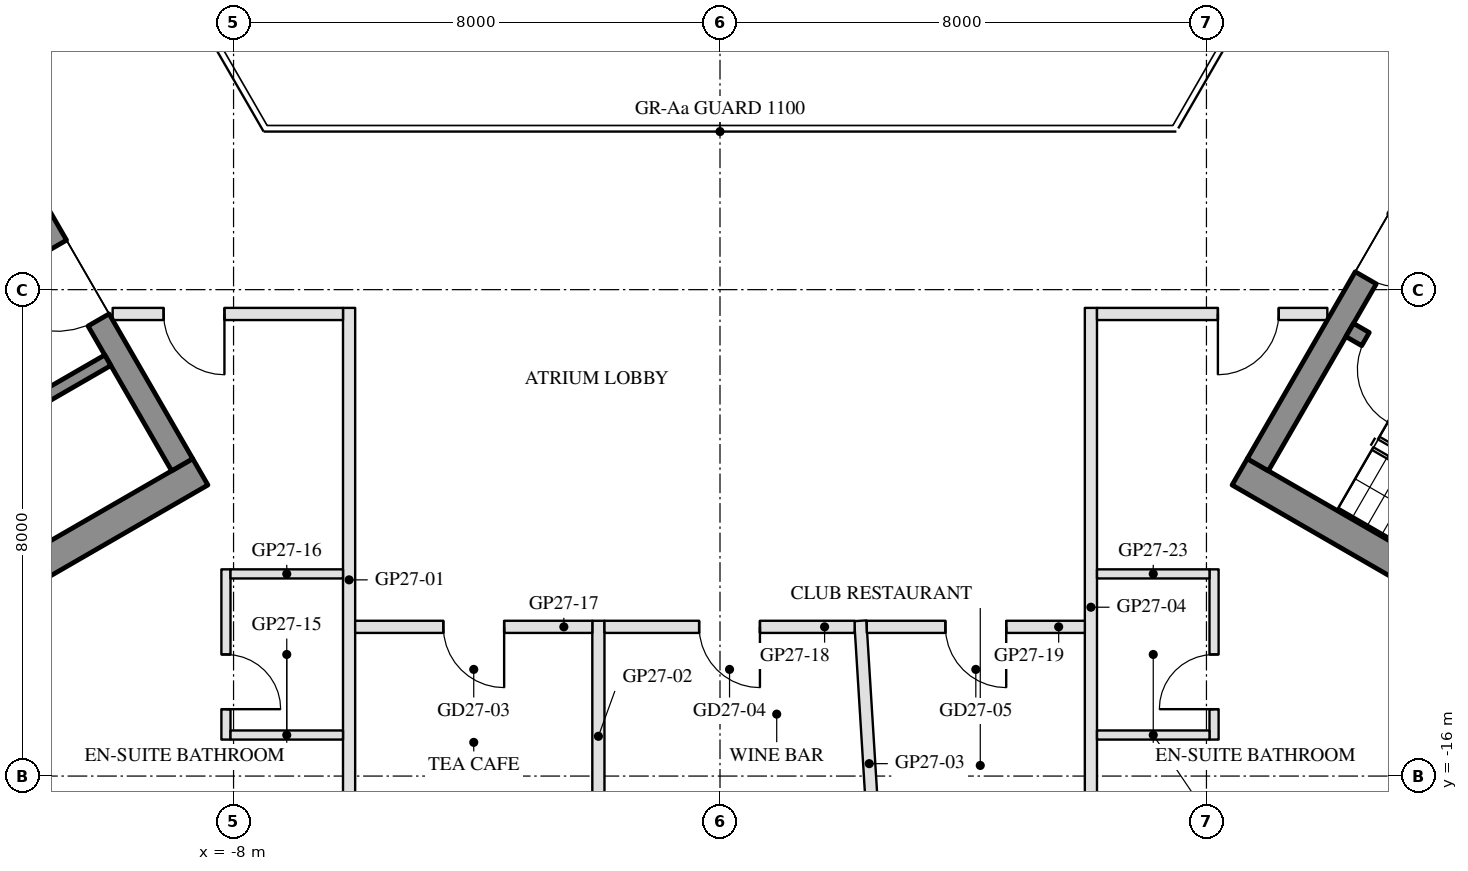
"""IFC4 building model, lengths in metres.
Left out: names, types, materials, properties, quantities, classifications, styles, units other than length and angle.
Written with IfcOpenShell. Run it as: python <this file> out.ifc"""

import sys

from ifc_helpers import new_model, si_unit, direction, frame, frame_2d, origin, origin_2d, place, context, subcontext, project, spatial, rectangle, hollow_rectangle, extrude, boolean, halfspace, element, fill, save


model = new_model("IFC4")
c1 = context("Model", 3, precision=1e-05, world=origin(), true_north=direction((0.0, 1.0)))
c2 = subcontext(c1, "Body", "Model", "MODEL_VIEW")
j1 = project(units=[si_unit("LENGTHUNIT", "METRE"), si_unit("PLANEANGLEUNIT", "RADIAN")], contexts=[c1])
p1 = place(None, origin())
s1 = spatial("IfcSite", under=j1, at=p1, CompositionType="ELEMENT")
p2 = place(p1, origin())
s2 = spatial("IfcBuilding", under=s1, at=p2, CompositionType="ELEMENT")
p3 = place(p2, frame((0.0, 0.0, 276.3)))
s3 = spatial("IfcBuildingStorey", under=s2, at=p3, CompositionType="ELEMENT", Elevation=276.3)
p4 = place(p3, frame((-7.444, -17.096, 0.0), z_axis=(0.060871062735, 0.151168564354, 0.986632038235), x_axis=(-0.998135304591, 0.004721094283, 0.0608574153)))
e1 = element("IfcColumn", 1, at=p4, inside=s3, PredefinedType="COLUMN", context=c2, shape_type="SweptSolid", body=[
    boolean("DIFFERENCE", boolean("DIFFERENCE", extrude(hollow_rectangle(XDim=0.65, YDim=0.65, WallThickness=0.03, at=origin_2d()), origin(), (0.0, 0.0, 1.0), 3.75), halfspace(frame((0.0, 0.0, 0.04), z_axis=(0.0, 0.0, 1.0), x_axis=(1.0, 0.0, 0.0)), True)), halfspace(frame((0.0, 0.0, 3.71), z_axis=(0.0, 0.0, 1.0), x_axis=(1.0, 0.0, 0.0)), False)),
])
p5 = place(p3, frame((0.0, -17.096, 0.0), z_axis=(0.0, 0.151449406449, 0.988465010653), x_axis=(-1.0, 0.0, 0.0)))
e2 = element("IfcColumn", 2, at=p5, inside=s3, PredefinedType="COLUMN", context=c2, shape_type="SweptSolid", body=[
    boolean("DIFFERENCE", boolean("DIFFERENCE", extrude(hollow_rectangle(XDim=0.65, YDim=0.65, WallThickness=0.03, at=origin_2d()), origin(), (0.0, 0.0, 1.0), 3.743), halfspace(frame((0.0, 0.0, 0.037), z_axis=(0.0, 0.0, 1.0), x_axis=(1.0, 0.0, 0.0)), True)), halfspace(frame((0.0, 0.0, 3.706), z_axis=(0.0, 0.0, 1.0), x_axis=(1.0, 0.0, 0.0)), False)),
])
p6 = place(p3, frame((7.444, -17.096, 0.0), z_axis=(-0.060871062735, 0.151168564354, 0.986632038235), x_axis=(0.998135304591, 0.004721094283, 0.0608574153)))
e3 = element("IfcColumn", 3, at=p6, inside=s3, PredefinedType="COLUMN", context=c2, shape_type="SweptSolid", body=[
    boolean("DIFFERENCE", boolean("DIFFERENCE", extrude(hollow_rectangle(XDim=0.65, YDim=0.65, WallThickness=0.03, at=origin_2d()), origin(), (0.0, 0.0, 1.0), 3.75), halfspace(frame((0.0, 0.0, 0.04), z_axis=(0.0, 0.0, 1.0), x_axis=(1.0, 0.0, 0.0)), True)), halfspace(frame((0.0, 0.0, 3.71), z_axis=(0.0, 0.0, 1.0), x_axis=(1.0, 0.0, 0.0)), False)),
])
p7 = place(p3, frame((-8.547, -10.997, 0.0), z_axis=(0.0, 0.0, 1.0), x_axis=(-0.866030218785, -0.499991660082, 0.0)))
e4 = element("IfcWall", 4, at=p7, inside=s3, PredefinedType="SHEAR", context=c2, shape_type="SweptSolid", body=[
    extrude(rectangle(XDim=13.031, YDim=0.5, at=frame_2d((6.516, 0.0))), origin(), (0.0, 0.0, 1.0), 3.5),
])
p8 = place(p3, frame((-13.845, -2.22, 0.0), z_axis=(0.0, 0.0, 1.0), x_axis=(0.500004234368, -0.866022959057, 0.0)))
e5 = element("IfcWall", 5, at=p8, inside=s3, PredefinedType="SHEAR", context=c2, shape_type="SweptSolid", body=[
    extrude(rectangle(XDim=10.0, YDim=0.4, at=frame_2d((5.0, 0.0))), origin(), (0.0, 0.0, 1.0), 3.5),
])
p9 = place(p8, frame((3.55, 0.0, 0.0)))
e6 = element("IfcOpeningElement", 6, at=p9, cuts=e5, PredefinedType="OPENING", context=c2, shape_type="SweptSolid", body=[
    extrude(rectangle(XDim=1.1, YDim=2.1, at=frame_2d((0.55, 1.05))), frame((0.0, 0.21, 0.0), z_axis=(0.0, -1.0, 0.0), x_axis=(1.0, 0.0, 0.0)), (0.0, 0.0, 1.0), 0.42),
])
p10 = place(p8, frame((5.85, 0.0, 0.0)))
e7 = element("IfcOpeningElement", 7, at=p10, cuts=e5, PredefinedType="OPENING", context=c2, shape_type="SweptSolid", body=[
    extrude(rectangle(XDim=1.4, YDim=2.1, at=frame_2d((0.7, 1.05))), frame((0.0, 0.21, 0.0), z_axis=(0.0, -1.0, 0.0), x_axis=(1.0, 0.0, 0.0)), (0.0, 0.0, 1.0), 0.42),
])
p11 = place(p3, frame((-10.068, -9.162, 0.0), z_axis=(0.0, 0.0, 1.0), x_axis=(-0.866032725843, -0.499987317609, 0.0)))
e8 = element("IfcWall", 8, at=p11, inside=s3, PredefinedType="SHEAR", context=c2, shape_type="SweptSolid", body=[
    extrude(rectangle(XDim=10.16, YDim=0.2, at=frame_2d((5.08, 0.0))), origin(), (0.0, 0.0, 1.0), 3.5),
])
p12 = place(p11, frame((1.99, 0.0, 0.0)))
e9 = element("IfcOpeningElement", 9, at=p12, cuts=e8, PredefinedType="OPENING", context=c2, shape_type="SweptSolid", body=[
    extrude(rectangle(XDim=0.9, YDim=2.1, at=frame_2d((0.45, 1.05))), frame((0.0, 0.11, 0.0), z_axis=(0.0, -1.0, 0.0), x_axis=(1.0, 0.0, 0.0)), (0.0, 0.0, 1.0), 0.22),
])
p13 = place(p11, frame((7.07, 0.0, 0.0)))
e10 = element("IfcOpeningElement", 10, at=p13, cuts=e8, PredefinedType="OPENING", context=c2, shape_type="SweptSolid", body=[
    extrude(rectangle(XDim=0.9, YDim=2.1, at=frame_2d((0.45, 1.05))), frame((0.0, 0.11, 0.0), z_axis=(0.0, -1.0, 0.0), x_axis=(1.0, 0.0, 0.0)), (0.0, 0.0, 1.0), 0.22),
])
p14 = place(p3, frame((8.547, -10.997, 0.0), z_axis=(0.0, 0.0, 1.0), x_axis=(0.866030218785, -0.499991660082, 0.0)))
e11 = element("IfcWall", 11, at=p14, inside=s3, PredefinedType="SHEAR", context=c2, shape_type="SweptSolid", body=[
    extrude(rectangle(XDim=13.031, YDim=0.5, at=frame_2d((6.516, 0.0))), origin(), (0.0, 0.0, 1.0), 3.5),
])
p15 = place(p3, frame((8.845, -10.88, 0.0), z_axis=(0.0, 0.0, 1.0), x_axis=(0.500004234368, 0.866022959057, 0.0)))
e12 = element("IfcWall", 12, at=p15, inside=s3, PredefinedType="SHEAR", context=c2, shape_type="SweptSolid", body=[
    extrude(rectangle(XDim=10.0, YDim=0.4, at=frame_2d((5.0, 0.0))), origin(), (0.0, 0.0, 1.0), 3.5),
])
p16 = place(p15, frame((3.55, 0.0, 0.0)))
e13 = element("IfcOpeningElement", 13, at=p16, cuts=e12, PredefinedType="OPENING", context=c2, shape_type="SweptSolid", body=[
    extrude(rectangle(XDim=1.1, YDim=2.1, at=frame_2d((0.55, 1.05))), frame((0.0, 0.21, 0.0), z_axis=(0.0, -1.0, 0.0), x_axis=(1.0, 0.0, 0.0)), (0.0, 0.0, 1.0), 0.42),
])
p17 = place(p15, frame((5.85, 0.0, 0.0)))
e14 = element("IfcOpeningElement", 14, at=p17, cuts=e12, PredefinedType="OPENING", context=c2, shape_type="SweptSolid", body=[
    extrude(rectangle(XDim=1.4, YDim=2.1, at=frame_2d((0.7, 1.05))), frame((0.0, 0.21, 0.0), z_axis=(0.0, -1.0, 0.0), x_axis=(1.0, 0.0, 0.0)), (0.0, 0.0, 1.0), 0.42),
])
p18 = place(p3, frame((10.356, -8.664, 0.0), z_axis=(0.0, 0.0, 1.0), x_axis=(0.866028629588, -0.499994412703, 0.0)))
e15 = element("IfcWall", 15, at=p18, inside=s3, PredefinedType="SHEAR", context=c2, shape_type="SweptSolid", body=[
    extrude(rectangle(XDim=6.45, YDim=0.25, at=frame_2d((3.225, 0.0))), origin(), (0.0, 0.0, 1.0), 3.5),
])
p19 = place(p18, frame((0.3, 0.0, 0.0)))
e16 = element("IfcOpeningElement", 16, at=p19, cuts=e15, PredefinedType="OPENING", context=c2, shape_type="SweptSolid", body=[
    extrude(rectangle(XDim=1.0, YDim=2.1, at=frame_2d((0.5, 1.05))), frame((0.0, 0.135, 0.0), z_axis=(0.0, -1.0, 0.0), x_axis=(1.0, 0.0, 0.0)), (0.0, 0.0, 1.0), 0.27),
])
p20 = place(p3, frame((-6.1, -17.246, 0.0), z_axis=(0.0, 0.0, 1.0), x_axis=(0.0, 1.0, 0.0)))
e17 = element("IfcWall", 17, at=p20, inside=s3, PredefinedType="PARTITIONING", context=c2, shape_type="SweptSolid", body=[
    extrude(rectangle(XDim=8.946, YDim=0.2, at=frame_2d((4.473, 0.0))), origin(), (0.0, 0.0, 1.0), 3.1),
])
p21 = place(p3, frame((-2.0, -17.246, 0.0), z_axis=(0.0, 0.0, 1.0), x_axis=(0.0, 1.0, 0.0)))
e18 = element("IfcWall", 18, at=p21, inside=s3, PredefinedType="PARTITIONING", context=c2, shape_type="SweptSolid", body=[
    extrude(rectangle(XDim=3.8, YDim=0.2, at=frame_2d((1.9, 0.0))), origin(), (0.0, 0.0, 1.0), 3.1),
])
p22 = place(p3, frame((2.6, -18.146, 0.0), z_axis=(0.0, 0.0, 1.0), x_axis=(-0.062110384133, 0.998069286264, 0.0)))
e19 = element("IfcWall", 19, at=p22, inside=s3, PredefinedType="PARTITIONING", context=c2, shape_type="SweptSolid", body=[
    extrude(rectangle(XDim=4.709, YDim=0.2, at=frame_2d((2.354, 0.0))), origin(), (0.0, 0.0, 1.0), 3.1),
])
p23 = place(p3, frame((6.1, -18.146, 0.0), z_axis=(0.0, 0.0, 1.0), x_axis=(0.0, 1.0, 0.0)))
e20 = element("IfcWall", 20, at=p23, inside=s3, PredefinedType="PARTITIONING", context=c2, shape_type="SweptSolid", body=[
    extrude(rectangle(XDim=9.846, YDim=0.2, at=frame_2d((4.923, 0.0))), origin(), (0.0, 0.0, 1.0), 3.1),
])
p24 = place(p3, frame((-6.2, -8.4, 0.0), z_axis=(0.0, 0.0, 1.0), x_axis=(-1.0, 0.0, 0.0)))
e21 = element("IfcWall", 21, at=p24, inside=s3, PredefinedType="PARTITIONING", context=c2, shape_type="SweptSolid", body=[
    extrude(rectangle(XDim=3.788, YDim=0.2, at=frame_2d((1.894, 0.0))), origin(), (0.0, 0.0, 1.0), 3.05),
])
p25 = place(p24, frame((1.95, 0.0, 0.0)))
e22 = element("IfcOpeningElement", 22, at=p25, cuts=e21, PredefinedType="OPENING", context=c2, shape_type="SweptSolid", body=[
    extrude(rectangle(XDim=1.0, YDim=2.1, at=frame_2d((0.5, 1.05))), frame((0.0, 0.11, 0.0), z_axis=(0.0, -1.0, 0.0), x_axis=(1.0, 0.0, 0.0)), (0.0, 0.0, 1.0), 0.22),
])
p26 = place(p3, frame((-8.125, -12.6, 0.0), z_axis=(0.0, 0.0, 1.0), x_axis=(0.0, -1.0, 0.0)))
e23 = element("IfcWall", 23, at=p26, inside=s3, PredefinedType="PARTITIONING", context=c2, shape_type="SweptSolid", body=[
    extrude(rectangle(XDim=2.8, YDim=0.15, at=frame_2d((1.4, 0.0))), origin(), (0.0, 0.0, 1.0), 3.55),
])
p27 = place(p26, frame((1.4, 0.0, 0.0)))
e24 = element("IfcOpeningElement", 24, at=p27, cuts=e23, PredefinedType="OPENING", context=c2, shape_type="SweptSolid", body=[
    extrude(rectangle(XDim=0.9, YDim=2.1, at=frame_2d((0.45, 1.05))), frame((0.0, 0.085, 0.0), z_axis=(0.0, -1.0, 0.0), x_axis=(1.0, 0.0, 0.0)), (0.0, 0.0, 1.0), 0.17),
])
for number, where, z_axis, x_axis in (
    (25, (-8.05, -15.325, 0.0), (0.0, 0.0, 1.0), (1.0, 0.0, 0.0)),
    (26, (-8.05, -12.675, 0.0), (0.0, 0.0, 1.0), (1.0, 0.0, 0.0)),
):
    element("IfcWall", number, at=place(p3, frame(where, z_axis=z_axis, x_axis=x_axis)), inside=s3, PredefinedType="PARTITIONING", context=c2, shape_type="SweptSolid", body=[
        extrude(rectangle(XDim=1.85, YDim=0.15, at=frame_2d((0.925, 0.0))), origin(), (0.0, 0.0, 1.0), 3.05),
    ])
p28 = place(p3, frame((-2.1, -13.546, 0.0), z_axis=(0.0, 0.0, 1.0), x_axis=(-1.0, 0.0, 0.0)))
e27 = element("IfcWall", 27, at=p28, inside=s3, PredefinedType="PARTITIONING", context=c2, shape_type="SweptSolid", body=[
    extrude(rectangle(XDim=3.9, YDim=0.2, at=frame_2d((1.95, 0.0))), origin(), (0.0, 0.0, 1.0), 3.05),
])
p29 = place(p28, frame((1.45, 0.0, 0.0)))
e28 = element("IfcOpeningElement", 28, at=p29, cuts=e27, PredefinedType="OPENING", context=c2, shape_type="SweptSolid", body=[
    extrude(rectangle(XDim=1.0, YDim=2.1, at=frame_2d((0.5, 1.05))), frame((0.0, 0.11, 0.0), z_axis=(0.0, -1.0, 0.0), x_axis=(1.0, 0.0, 0.0)), (0.0, 0.0, 1.0), 0.22),
])
p30 = place(p3, frame((2.214, -13.546, 0.0), z_axis=(0.0, 0.0, 1.0), x_axis=(-1.0, 0.0, 0.0)))
e29 = element("IfcWall", 29, at=p30, inside=s3, PredefinedType="PARTITIONING", context=c2, shape_type="SweptSolid", body=[
    extrude(rectangle(XDim=4.114, YDim=0.2, at=frame_2d((2.057, 0.0))), origin(), (0.0, 0.0, 1.0), 3.05),
])
p31 = place(p30, frame((1.557, 0.0, 0.0)))
e30 = element("IfcOpeningElement", 30, at=p31, cuts=e29, PredefinedType="OPENING", context=c2, shape_type="SweptSolid", body=[
    extrude(rectangle(XDim=1.0, YDim=2.1, at=frame_2d((0.5, 1.05))), frame((0.0, 0.11, 0.0), z_axis=(0.0, -1.0, 0.0), x_axis=(1.0, 0.0, 0.0)), (0.0, 0.0, 1.0), 0.22),
])
p32 = place(p3, frame((6.0, -13.546, 0.0), z_axis=(0.0, 0.0, 1.0), x_axis=(-1.0, 0.0, 0.0)))
e31 = element("IfcWall", 31, at=p32, inside=s3, PredefinedType="PARTITIONING", context=c2, shape_type="SweptSolid", body=[
    extrude(rectangle(XDim=3.586, YDim=0.2, at=frame_2d((1.793, 0.0))), origin(), (0.0, 0.0, 1.0), 3.05),
])
p33 = place(p32, frame((1.293, 0.0, 0.0)))
e32 = element("IfcOpeningElement", 32, at=p33, cuts=e31, PredefinedType="OPENING", context=c2, shape_type="SweptSolid", body=[
    extrude(rectangle(XDim=1.0, YDim=2.1, at=frame_2d((0.5, 1.05))), frame((0.0, 0.11, 0.0), z_axis=(0.0, -1.0, 0.0), x_axis=(1.0, 0.0, 0.0)), (0.0, 0.0, 1.0), 0.22),
])
p34 = place(p3, frame((9.988, -8.4, 0.0), z_axis=(0.0, 0.0, 1.0), x_axis=(-1.0, 0.0, 0.0)))
e33 = element("IfcWall", 33, at=p34, inside=s3, PredefinedType="PARTITIONING", context=c2, shape_type="SweptSolid", body=[
    extrude(rectangle(XDim=3.788, YDim=0.2, at=frame_2d((1.894, 0.0))), origin(), (0.0, 0.0, 1.0), 3.05),
])
p35 = place(p34, frame((0.8, 0.0, 0.0)))
e34 = element("IfcOpeningElement", 34, at=p35, cuts=e33, PredefinedType="OPENING", context=c2, shape_type="SweptSolid", body=[
    extrude(rectangle(XDim=1.0, YDim=2.1, at=frame_2d((0.5, 1.05))), frame((0.0, 0.11, 0.0), z_axis=(0.0, -1.0, 0.0), x_axis=(1.0, 0.0, 0.0)), (0.0, 0.0, 1.0), 0.22),
])
p36 = place(p3, frame((8.125, -15.4, 0.0), z_axis=(0.0, 0.0, 1.0), x_axis=(0.0, 1.0, 0.0)))
e35 = element("IfcWall", 35, at=p36, inside=s3, PredefinedType="PARTITIONING", context=c2, shape_type="SweptSolid", body=[
    extrude(rectangle(XDim=2.8, YDim=0.15, at=frame_2d((1.4, 0.0))), origin(), (0.0, 0.0, 1.0), 3.55),
])
p37 = place(p36, frame((0.5, 0.0, 0.0)))
e36 = element("IfcOpeningElement", 36, at=p37, cuts=e35, PredefinedType="OPENING", context=c2, shape_type="SweptSolid", body=[
    extrude(rectangle(XDim=0.9, YDim=2.1, at=frame_2d((0.45, 1.05))), frame((0.0, 0.085, 0.0), z_axis=(0.0, -1.0, 0.0), x_axis=(1.0, 0.0, 0.0)), (0.0, 0.0, 1.0), 0.17),
])
for number, where, z_axis, x_axis in (
    (37, (6.2, -15.325, 0.0), (0.0, 0.0, 1.0), (1.0, 0.0, 0.0)),
    (38, (6.2, -12.675, 0.0), (0.0, 0.0, 1.0), (1.0, 0.0, 0.0)),
):
    element("IfcWall", number, at=place(p3, frame(where, z_axis=z_axis, x_axis=x_axis)), inside=s3, PredefinedType="PARTITIONING", context=c2, shape_type="SweptSolid", body=[
        extrude(rectangle(XDim=1.85, YDim=0.15, at=frame_2d((0.925, 0.0))), origin(), (0.0, 0.0, 1.0), 3.05),
    ])
p38 = place(p3, frame((10.375, -1.169, 0.0), z_axis=(0.0, 0.0, 1.0), x_axis=(0.500055316652, -0.865993464345, 0.0)))
e39 = element("IfcWall", 39, at=p38, inside=s3, PredefinedType="PARTITIONING", context=c2, shape_type="SweptSolid", body=[
    extrude(rectangle(XDim=3.788, YDim=0.2, at=frame_2d((1.894, 0.0))), origin(), (0.0, 0.0, 1.0), 3.05),
])
p39 = place(p38, frame((1.95, 0.0, 0.0)))
e40 = element("IfcOpeningElement", 40, at=p39, cuts=e39, PredefinedType="OPENING", context=c2, shape_type="SweptSolid", body=[
    extrude(rectangle(XDim=1.0, YDim=2.1, at=frame_2d((0.5, 1.05))), frame((0.0, 0.11, 0.0), z_axis=(0.0, -1.0, 0.0), x_axis=(1.0, 0.0, 0.0)), (0.0, 0.0, 1.0), 0.22),
])
p40 = place(p3, frame((-12.269, -4.45, 0.0), z_axis=(0.0, 0.0, 1.0), x_axis=(0.500013576925, 0.866017565001, 0.0)))
e41 = element("IfcWall", 41, at=p40, inside=s3, PredefinedType="PARTITIONING", context=c2, shape_type="SweptSolid", body=[
    extrude(rectangle(XDim=3.775, YDim=0.2, at=frame_2d((1.887, 0.0))), origin(), (0.0, 0.0, 1.0), 3.05),
])
p41 = place(p40, frame((0.8, 0.0, 0.0)))
e42 = element("IfcOpeningElement", 42, at=p41, cuts=e41, PredefinedType="OPENING", context=c2, shape_type="SweptSolid", body=[
    extrude(rectangle(XDim=1.0, YDim=2.1, at=frame_2d((0.5, 1.05))), frame((0.0, 0.11, 0.0), z_axis=(0.0, -1.0, 0.0), x_axis=(1.0, 0.0, 0.0)), (0.0, 0.0, 1.0), 0.22),
])
p42 = place(p10, frame((1.4, 0.0, 0.0), z_axis=(0.0, 0.0, 1.0), x_axis=(-1.0, 0.0, 0.0)))
e43 = element("IfcDoor", 43, at=p42, inside=s3, OperationType="DOUBLE_DOOR_SINGLE_SWING", PredefinedType="DOOR", context=c2, shape_type="SweptSolid", body=[
    extrude(rectangle(XDim=1.4, YDim=2.1, at=frame_2d((0.7, 1.05))), frame((0.0, 0.025, 0.0), z_axis=(0.0, -1.0, 0.0), x_axis=(1.0, 0.0, 0.0)), (0.0, 0.0, 1.0), 0.05),
])
fill(e7, e43)
p43 = place(p16, frame((1.1, 0.0, 0.0), z_axis=(0.0, 0.0, 1.0), x_axis=(-1.0, 0.0, 0.0)))
e44 = element("IfcDoor", 44, at=p43, inside=s3, OperationType="SINGLE_SWING_LEFT", PredefinedType="DOOR", context=c2, shape_type="SweptSolid", body=[
    extrude(rectangle(XDim=1.1, YDim=2.1, at=frame_2d((0.55, 1.05))), frame((0.0, 0.025, 0.0), z_axis=(0.0, -1.0, 0.0), x_axis=(1.0, 0.0, 0.0)), (0.0, 0.0, 1.0), 0.05),
])
fill(e13, e44)
p44 = place(p19, frame((1.0, 0.0, 0.0), z_axis=(0.0, 0.0, 1.0), x_axis=(-1.0, 0.0, 0.0)))
e45 = element("IfcDoor", 45, at=p44, inside=s3, OperationType="SINGLE_SWING_LEFT", PredefinedType="DOOR", context=c2, shape_type="SweptSolid", body=[
    extrude(rectangle(XDim=1.0, YDim=2.1, at=frame_2d((0.5, 1.05))), frame((0.0, 0.025, 0.0), z_axis=(0.0, -1.0, 0.0), x_axis=(1.0, 0.0, 0.0)), (0.0, 0.0, 1.0), 0.05),
])
fill(e16, e45)
p45 = place(p27, origin())
e46 = element("IfcDoor", 46, at=p45, inside=s3, OperationType="SINGLE_SWING_RIGHT", PredefinedType="DOOR", context=c2, shape_type="SweptSolid", body=[
    extrude(rectangle(XDim=0.9, YDim=2.1, at=frame_2d((0.45, 1.05))), frame((0.0, 0.025, 0.0), z_axis=(0.0, -1.0, 0.0), x_axis=(1.0, 0.0, 0.0)), (0.0, 0.0, 1.0), 0.05),
])
fill(e24, e46)
p46 = place(p25, origin())
e47 = element("IfcDoor", 47, at=p46, inside=s3, OperationType="SINGLE_SWING_LEFT", PredefinedType="DOOR", context=c2, shape_type="SweptSolid", body=[
    extrude(rectangle(XDim=1.0, YDim=2.1, at=frame_2d((0.5, 1.05))), frame((0.0, 0.025, 0.0), z_axis=(0.0, -1.0, 0.0), x_axis=(1.0, 0.0, 0.0)), (0.0, 0.0, 1.0), 0.05),
])
fill(e22, e47)
p47 = place(p29, origin())
e48 = element("IfcDoor", 48, at=p47, inside=s3, OperationType="SINGLE_SWING_LEFT", PredefinedType="DOOR", context=c2, shape_type="SweptSolid", body=[
    extrude(rectangle(XDim=1.0, YDim=2.1, at=frame_2d((0.5, 1.05))), frame((0.0, 0.025, 0.0), z_axis=(0.0, -1.0, 0.0), x_axis=(1.0, 0.0, 0.0)), (0.0, 0.0, 1.0), 0.05),
])
fill(e28, e48)
p48 = place(p31, origin())
e49 = element("IfcDoor", 49, at=p48, inside=s3, OperationType="SINGLE_SWING_LEFT", PredefinedType="DOOR", context=c2, shape_type="SweptSolid", body=[
    extrude(rectangle(XDim=1.0, YDim=2.1, at=frame_2d((0.5, 1.05))), frame((0.0, 0.025, 0.0), z_axis=(0.0, -1.0, 0.0), x_axis=(1.0, 0.0, 0.0)), (0.0, 0.0, 1.0), 0.05),
])
fill(e30, e49)
p49 = place(p33, origin())
e50 = element("IfcDoor", 50, at=p49, inside=s3, OperationType="SINGLE_SWING_LEFT", PredefinedType="DOOR", context=c2, shape_type="SweptSolid", body=[
    extrude(rectangle(XDim=1.0, YDim=2.1, at=frame_2d((0.5, 1.05))), frame((0.0, 0.025, 0.0), z_axis=(0.0, -1.0, 0.0), x_axis=(1.0, 0.0, 0.0)), (0.0, 0.0, 1.0), 0.05),
])
fill(e32, e50)
p50 = place(p37, origin())
e51 = element("IfcDoor", 51, at=p50, inside=s3, OperationType="SINGLE_SWING_LEFT", PredefinedType="DOOR", context=c2, shape_type="SweptSolid", body=[
    extrude(rectangle(XDim=0.9, YDim=2.1, at=frame_2d((0.45, 1.05))), frame((0.0, 0.025, 0.0), z_axis=(0.0, -1.0, 0.0), x_axis=(1.0, 0.0, 0.0)), (0.0, 0.0, 1.0), 0.05),
])
fill(e36, e51)
p51 = place(p35, origin())
e52 = element("IfcDoor", 52, at=p51, inside=s3, OperationType="SINGLE_SWING_RIGHT", PredefinedType="DOOR", context=c2, shape_type="SweptSolid", body=[
    extrude(rectangle(XDim=1.0, YDim=2.1, at=frame_2d((0.5, 1.05))), frame((0.0, 0.025, 0.0), z_axis=(0.0, -1.0, 0.0), x_axis=(1.0, 0.0, 0.0)), (0.0, 0.0, 1.0), 0.05),
])
fill(e34, e52)
save(model, sys.argv[1])
